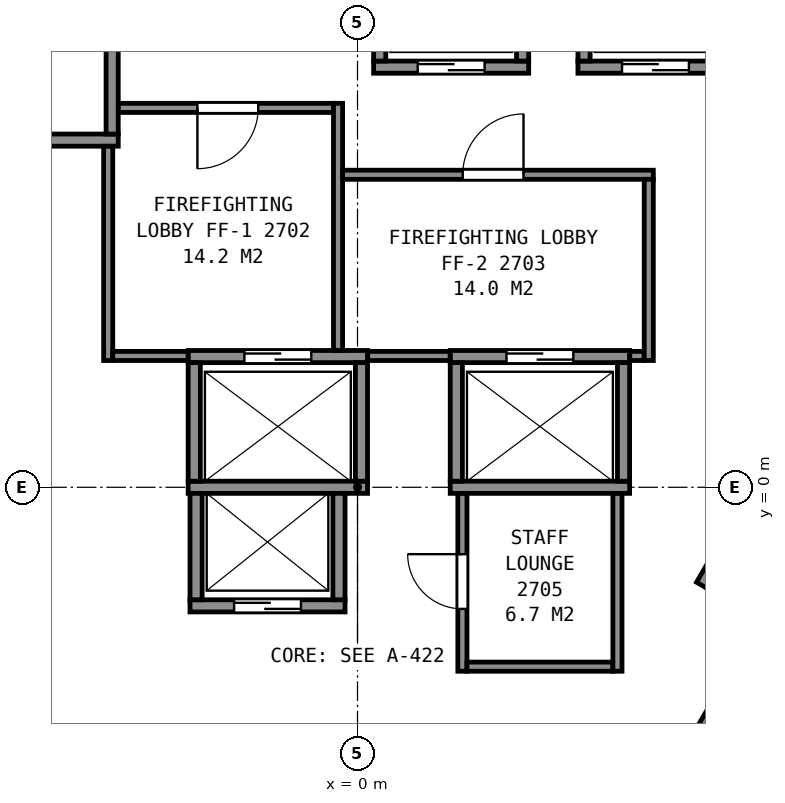
"""IFC4 building model, lengths in metres.
Left out: names, types, materials, properties, quantities, classifications, styles, units other than length and angle.
Written with IfcOpenShell. Run it as: python <this file> out.ifc"""

import sys

from ifc_helpers import new_model, si_unit, direction, frame, frame_2d, origin, place, context, subcontext, project, spatial, rectangle, extrude, element, fill, save


model = new_model("IFC4")
c1 = context("Model", 3, precision=1e-05, world=origin(), true_north=direction((0.0, 1.0)))
c2 = subcontext(c1, "Body", "Model", "MODEL_VIEW")
j1 = project(units=[si_unit("LENGTHUNIT", "METRE"), si_unit("PLANEANGLEUNIT", "RADIAN")], contexts=[c1])
p1 = place(None, origin())
s1 = spatial("IfcSite", under=j1, at=p1, CompositionType="ELEMENT")
p2 = place(p1, origin())
s2 = spatial("IfcBuilding", under=s1, at=p2, CompositionType="ELEMENT")
p3 = place(p2, frame((0.0, 0.0, 114.4)))
s3 = spatial("IfcBuildingStorey", under=s2, at=p3, CompositionType="ELEMENT", Elevation=114.4)
p4 = place(p3, frame((-2.755, -1.95, 0.0), z_axis=(0.0, 0.0, 1.0), x_axis=(1.0, 0.0, 0.0)))
e1 = element("IfcWall", 1, at=p4, inside=s3, PredefinedType="PARTITIONING", context=c2, shape_type="SweptSolid", body=[
    extrude(rectangle(XDim=2.55, YDim=0.2, at=frame_2d((1.275, 0.0))), origin(), (0.0, 0.0, 1.0), 3.6),
])
p5 = place(p4, frame((0.725, 0.0, 0.0)))
e2 = element("IfcOpeningElement", 2, at=p5, cuts=e1, PredefinedType="OPENING", context=c2, shape_type="SweptSolid", body=[
    extrude(rectangle(XDim=1.1, YDim=2.1, at=frame_2d((0.55, 1.05))), frame((0.0, 0.11, 0.0), z_axis=(0.0, -1.0, 0.0), x_axis=(1.0, 0.0, 0.0)), (0.0, 0.0, 1.0), 0.22),
])
p6 = place(p3, frame((-2.785, 0.0, 0.0), z_axis=(0.0, 0.0, 1.0), x_axis=(1.0, 0.0, 0.0)))
e3 = element("IfcWall", 3, at=p6, inside=s3, PredefinedType="PARTITIONING", context=c2, shape_type="SweptSolid", body=[
    extrude(rectangle(XDim=2.95, YDim=0.2, at=frame_2d((1.475, 0.0))), origin(), (0.0, 0.0, 1.0), 3.6),
])
p7 = place(p3, frame((1.525, 0.0, 0.0), z_axis=(0.0, 0.0, 1.0), x_axis=(1.0, 0.0, 0.0)))
e4 = element("IfcWall", 4, at=p7, inside=s3, PredefinedType="PARTITIONING", context=c2, shape_type="SweptSolid", body=[
    extrude(rectangle(XDim=2.95, YDim=0.2, at=frame_2d((1.475, 0.0))), origin(), (0.0, 0.0, 1.0), 3.6),
])
p8 = place(p3, frame((-2.785, 2.15, 0.0), z_axis=(0.0, 0.0, 1.0), x_axis=(1.0, 0.0, 0.0)))
e5 = element("IfcWall", 5, at=p8, inside=s3, PredefinedType="PARTITIONING", context=c2, shape_type="SweptSolid", body=[
    extrude(rectangle(XDim=2.95, YDim=0.2, at=frame_2d((1.475, 0.0))), origin(), (0.0, 0.0, 1.0), 3.6),
])
p9 = place(p8, frame((0.925, 0.0, 0.0)))
e6 = element("IfcOpeningElement", 6, at=p9, cuts=e5, PredefinedType="OPENING", context=c2, shape_type="SweptSolid", body=[
    extrude(rectangle(XDim=1.1, YDim=2.1, at=frame_2d((0.55, 1.05))), frame((0.0, 0.11, 0.0), z_axis=(0.0, -1.0, 0.0), x_axis=(1.0, 0.0, 0.0)), (0.0, 0.0, 1.0), 0.22),
])
p10 = place(p3, frame((1.525, 2.15, 0.0), z_axis=(0.0, 0.0, 1.0), x_axis=(1.0, 0.0, 0.0)))
e7 = element("IfcWall", 7, at=p10, inside=s3, PredefinedType="PARTITIONING", context=c2, shape_type="SweptSolid", body=[
    extrude(rectangle(XDim=2.95, YDim=0.2, at=frame_2d((1.475, 0.0))), origin(), (0.0, 0.0, 1.0), 3.6),
])
p11 = place(p10, frame((0.925, 0.0, 0.0)))
e8 = element("IfcOpeningElement", 8, at=p11, cuts=e7, PredefinedType="OPENING", context=c2, shape_type="SweptSolid", body=[
    extrude(rectangle(XDim=1.1, YDim=2.1, at=frame_2d((0.55, 1.05))), frame((0.0, 0.11, 0.0), z_axis=(0.0, -1.0, 0.0), x_axis=(1.0, 0.0, 0.0)), (0.0, 0.0, 1.0), 0.22),
])
p12 = place(p3, frame((-6.285, 5.71, 0.0), z_axis=(0.0, 0.0, 1.0), x_axis=(1.0, 0.0, 0.0)))
e9 = element("IfcWall", 9, at=p12, inside=s3, PredefinedType="PARTITIONING", context=c2, shape_type="SweptSolid", body=[
    extrude(rectangle(XDim=2.35, YDim=0.2, at=frame_2d((1.175, 0.0))), origin(), (0.0, 0.0, 1.0), 3.6),
])
p13 = place(p3, frame((0.265, 6.91, 0.0), z_axis=(0.0, 0.0, 1.0), x_axis=(1.0, 0.0, 0.0)))
e10 = element("IfcWall", 10, at=p13, inside=s3, PredefinedType="PARTITIONING", context=c2, shape_type="SweptSolid", body=[
    extrude(rectangle(XDim=2.55, YDim=0.2, at=frame_2d((1.275, 0.0))), origin(), (0.0, 0.0, 1.0), 3.6),
])
p14 = place(p13, frame((0.725, 0.0, 0.0)))
e11 = element("IfcOpeningElement", 11, at=p14, cuts=e10, PredefinedType="OPENING", context=c2, shape_type="SweptSolid", body=[
    extrude(rectangle(XDim=1.1, YDim=2.1, at=frame_2d((0.55, 1.05))), frame((0.0, 0.11, 0.0), z_axis=(0.0, -1.0, 0.0), x_axis=(1.0, 0.0, 0.0)), (0.0, 0.0, 1.0), 0.22),
])
p15 = place(p3, frame((3.625, 6.91, 0.0), z_axis=(0.0, 0.0, 1.0), x_axis=(1.0, 0.0, 0.0)))
e12 = element("IfcWall", 12, at=p15, inside=s3, PredefinedType="PARTITIONING", context=c2, shape_type="SweptSolid", body=[
    extrude(rectangle(XDim=2.55, YDim=0.2, at=frame_2d((1.275, 0.0))), origin(), (0.0, 0.0, 1.0), 3.6),
])
p16 = place(p15, frame((0.725, 0.0, 0.0)))
e13 = element("IfcOpeningElement", 13, at=p16, cuts=e12, PredefinedType="OPENING", context=c2, shape_type="SweptSolid", body=[
    extrude(rectangle(XDim=1.1, YDim=2.1, at=frame_2d((0.55, 1.05))), frame((0.0, 0.11, 0.0), z_axis=(0.0, -1.0, 0.0), x_axis=(1.0, 0.0, 0.0)), (0.0, 0.0, 1.0), 0.22),
])
p17 = place(p3, frame((5.527, -4.247, 0.0), z_axis=(0.0, 0.0, 1.0), x_axis=(0.499938297808, 0.866061024631, 0.0)))
e14 = element("IfcWall", 14, at=p17, inside=s3, PredefinedType="PARTITIONING", context=c2, shape_type="SweptSolid", body=[
    extrude(rectangle(XDim=2.35, YDim=0.2, at=frame_2d((1.175, 0.0))), origin(), (0.0, 0.0, 1.0), 3.6),
])
p18 = place(p17, frame((0.725, 0.0, 0.0)))
e15 = element("IfcOpeningElement", 15, at=p18, cuts=e14, PredefinedType="OPENING", context=c2, shape_type="SweptSolid", body=[
    extrude(rectangle(XDim=1.1, YDim=2.1, at=frame_2d((0.55, 1.05))), frame((0.0, 0.11, 0.0), z_axis=(0.0, -1.0, 0.0), x_axis=(1.0, 0.0, 0.0)), (0.0, 0.0, 1.0), 0.22),
])
p19 = place(p3, frame((5.663, -1.612, 0.0), z_axis=(0.0, 0.0, 1.0), x_axis=(0.49998122708, 0.866036242063, 0.0)))
e16 = element("IfcWall", 16, at=p19, inside=s3, PredefinedType="PARTITIONING", context=c2, shape_type="SweptSolid", body=[
    extrude(rectangle(XDim=4.9, YDim=0.2, at=frame_2d((2.45, 0.0))), origin(), (0.0, 0.0, 1.0), 3.6),
])
p20 = place(p3, frame((4.375, 0.1, 0.0), z_axis=(0.0, 0.0, 1.0), x_axis=(0.0, 1.0, 0.0)))
e17 = element("IfcWall", 17, at=p20, inside=s3, PredefinedType="PARTITIONING", context=c2, shape_type="SweptSolid", body=[
    extrude(rectangle(XDim=1.95, YDim=0.2, at=frame_2d((0.975, 0.0))), origin(), (0.0, 0.0, 1.0), 3.6),
])
for number, where, z_axis, x_axis in (
    (18, (3.725, 7.01, 0.0), (0.0, 0.0, 1.0), (0.0, 1.0, 0.0)),
    (19, (2.715, 7.01, 0.0), (0.0, 0.0, 1.0), (0.0, 1.0, 0.0)),
):
    element("IfcWall", number, at=place(p3, frame(where, z_axis=z_axis, x_axis=x_axis)), inside=s3, PredefinedType="PARTITIONING", context=c2, shape_type="SweptSolid", body=[
        extrude(rectangle(XDim=1.75, YDim=0.2, at=frame_2d((0.875, 0.0))), origin(), (0.0, 0.0, 1.0), 3.6),
    ])
p21 = place(p3, frame((1.625, 0.1, 0.0), z_axis=(0.0, 0.0, 1.0), x_axis=(0.0, 1.0, 0.0)))
e20 = element("IfcWall", 20, at=p21, inside=s3, PredefinedType="PARTITIONING", context=c2, shape_type="SweptSolid", body=[
    extrude(rectangle(XDim=1.95, YDim=0.2, at=frame_2d((0.975, 0.0))), origin(), (0.0, 0.0, 1.0), 3.6),
])
p22 = place(p3, frame((0.365, 7.01, 0.0), z_axis=(0.0, 0.0, 1.0), x_axis=(0.0, 1.0, 0.0)))
e21 = element("IfcWall", 21, at=p22, inside=s3, PredefinedType="PARTITIONING", context=c2, shape_type="SweptSolid", body=[
    extrude(rectangle(XDim=1.75, YDim=0.2, at=frame_2d((0.875, 0.0))), origin(), (0.0, 0.0, 1.0), 3.6),
])
p23 = place(p3, frame((0.065, 0.1, 0.0), z_axis=(0.0, 0.0, 1.0), x_axis=(0.0, 1.0, 0.0)))
e22 = element("IfcWall", 22, at=p23, inside=s3, PredefinedType="PARTITIONING", context=c2, shape_type="SweptSolid", body=[
    extrude(rectangle(XDim=1.95, YDim=0.2, at=frame_2d((0.975, 0.0))), origin(), (0.0, 0.0, 1.0), 3.6),
])
for number, where, z_axis, x_axis in (
    (23, (-0.305, -1.85, 0.0), (0.0, 0.0, 1.0), (0.0, 1.0, 0.0)),
    (24, (-2.655, -1.85, 0.0), (0.0, 0.0, 1.0), (0.0, 1.0, 0.0)),
):
    element("IfcWall", number, at=place(p3, frame(where, z_axis=z_axis, x_axis=x_axis)), inside=s3, PredefinedType="PARTITIONING", context=c2, shape_type="SweptSolid", body=[
        extrude(rectangle(XDim=1.75, YDim=0.2, at=frame_2d((0.875, 0.0))), origin(), (0.0, 0.0, 1.0), 3.6),
    ])
p24 = place(p3, frame((-2.685, 0.1, 0.0), z_axis=(0.0, 0.0, 1.0), x_axis=(0.0, 1.0, 0.0)))
e25 = element("IfcWall", 25, at=p24, inside=s3, PredefinedType="PARTITIONING", context=c2, shape_type="SweptSolid", body=[
    extrude(rectangle(XDim=1.95, YDim=0.2, at=frame_2d((0.975, 0.0))), origin(), (0.0, 0.0, 1.0), 3.6),
])
p25 = place(p3, frame((-4.035, 5.81, 0.0), z_axis=(0.0, 0.0, 1.0), x_axis=(0.0, 1.0, 0.0)))
e26 = element("IfcWall", 26, at=p25, inside=s3, PredefinedType="PARTITIONING", context=c2, shape_type="SweptSolid", body=[
    extrude(rectangle(XDim=1.75, YDim=0.2, at=frame_2d((0.875, 0.0))), origin(), (0.0, 0.0, 1.0), 3.6),
])
p26 = place(p3, frame((-13.664, 5.946, 0.0), z_axis=(0.0, 0.0, 1.0), x_axis=(0.499994327219, -0.866028678941, 0.0)))
e27 = element("IfcWall", 27, at=p26, inside=s3, PredefinedType="PARTITIONING", context=c2, shape_type="SweptSolid", body=[
    extrude(rectangle(XDim=23.968, YDim=0.2, at=frame_2d((11.984, 0.0))), origin(), (0.0, 0.0, 1.0), 3.35),
])
p27 = place(p3, frame((-4.152, -5.729, 0.0), z_axis=(0.0, 0.0, 1.0), x_axis=(-0.500024287448, 0.866011380966, 0.0)))
e28 = element("IfcWall", 28, at=p27, inside=s3, PredefinedType="PARTITIONING", context=c2, shape_type="SweptSolid", body=[
    extrude(rectangle(XDim=3.501, YDim=0.15, at=frame_2d((1.75, 0.0))), origin(), (0.0, 0.0, 1.0), 3.35),
])
p28 = place(p27, frame((2.026, 0.0, 0.0)))
e29 = element("IfcOpeningElement", 29, at=p28, cuts=e28, PredefinedType="OPENING", context=c2, shape_type="SweptSolid", body=[
    extrude(rectangle(XDim=0.9, YDim=2.1, at=frame_2d((0.45, 1.05))), frame((0.0, 0.085, 0.0), z_axis=(0.0, -1.0, 0.0), x_axis=(1.0, 0.0, 0.0)), (0.0, 0.0, 1.0), 0.17),
])
p29 = place(p27, frame((0.248, 0.0, 0.0)))
e30 = element("IfcOpeningElement", 30, at=p29, cuts=e28, PredefinedType="OPENING", context=c2, shape_type="SweptSolid", body=[
    extrude(rectangle(XDim=0.9, YDim=2.1, at=frame_2d((0.45, 1.05))), frame((0.0, 0.085, 0.0), z_axis=(0.0, -1.0, 0.0), x_axis=(1.0, 0.0, 0.0)), (0.0, 0.0, 1.0), 0.17),
])
p30 = place(p3, frame((-4.1, 2.085, 0.0), z_axis=(0.0, 0.0, 1.0), x_axis=(0.0, 1.0, 0.0)))
e31 = element("IfcWall", 31, at=p30, inside=s3, PredefinedType="PARTITIONING", context=c2, shape_type="SweptSolid", body=[
    extrude(rectangle(XDim=3.523, YDim=0.15, at=frame_2d((1.761, 0.0))), origin(), (0.0, 0.0, 1.0), 3.35),
])
p31 = place(p3, frame((-4.025, 2.16, 0.0), z_axis=(0.0, 0.0, 1.0), x_axis=(1.0, 0.0, 0.0)))
e32 = element("IfcWall", 32, at=p31, inside=s3, PredefinedType="PARTITIONING", context=c2, shape_type="SweptSolid", body=[
    extrude(rectangle(XDim=1.238, YDim=0.15, at=frame_2d((0.619, 0.0))), origin(), (0.0, 0.0, 1.0), 3.35),
])
p32 = place(p3, frame((-3.933, 6.24, 0.0), z_axis=(0.0, 0.0, 1.0), x_axis=(1.0, 0.0, 0.0)))
e33 = element("IfcWall", 33, at=p32, inside=s3, PredefinedType="PARTITIONING", context=c2, shape_type="SweptSolid", body=[
    extrude(rectangle(XDim=3.538, YDim=0.15, at=frame_2d((1.769, 0.0))), origin(), (0.0, 0.0, 1.0), 3.35),
])
p33 = place(p32, frame((1.3, 0.0, 0.0)))
e34 = element("IfcOpeningElement", 34, at=p33, cuts=e33, PredefinedType="OPENING", context=c2, shape_type="SweptSolid", body=[
    extrude(rectangle(XDim=1.0, YDim=2.1, at=frame_2d((0.5, 1.05))), frame((0.0, 0.085, 0.0), z_axis=(0.0, -1.0, 0.0), x_axis=(1.0, 0.0, 0.0)), (0.0, 0.0, 1.0), 0.17),
])
p34 = place(p3, frame((-0.32, 2.252, 0.0), z_axis=(0.0, 0.0, 1.0), x_axis=(0.0, 1.0, 0.0)))
e35 = element("IfcWall", 35, at=p34, inside=s3, PredefinedType="PARTITIONING", context=c2, shape_type="SweptSolid", body=[
    extrude(rectangle(XDim=4.063, YDim=0.15, at=frame_2d((2.031, 0.0))), origin(), (0.0, 0.0, 1.0), 3.35),
])
p35 = place(p3, frame((-0.245, 5.14, 0.0), z_axis=(0.0, 0.0, 1.0), x_axis=(1.0, 0.0, 0.0)))
e36 = element("IfcWall", 36, at=p35, inside=s3, PredefinedType="PARTITIONING", context=c2, shape_type="SweptSolid", body=[
    extrude(rectangle(XDim=5.11, YDim=0.15, at=frame_2d((2.555, 0.0))), origin(), (0.0, 0.0, 1.0), 3.35),
])
p36 = place(p35, frame((1.975, 0.0, 0.0)))
e37 = element("IfcOpeningElement", 37, at=p36, cuts=e36, PredefinedType="OPENING", context=c2, shape_type="SweptSolid", body=[
    extrude(rectangle(XDim=1.0, YDim=2.1, at=frame_2d((0.5, 1.05))), frame((0.0, 0.085, 0.0), z_axis=(0.0, -1.0, 0.0), x_axis=(1.0, 0.0, 0.0)), (0.0, 0.0, 1.0), 0.17),
])
p37 = place(p3, frame((0.167, 2.16, 0.0), z_axis=(0.0, 0.0, 1.0), x_axis=(1.0, 0.0, 0.0)))
e38 = element("IfcWall", 38, at=p37, inside=s3, PredefinedType="PARTITIONING", context=c2, shape_type="SweptSolid", body=[
    extrude(rectangle(XDim=1.356, YDim=0.15, at=frame_2d((0.678, 0.0))), origin(), (0.0, 0.0, 1.0), 3.35),
])
p38 = place(p3, frame((1.725, -0.102, 0.0), z_axis=(0.0, 0.0, 1.0), x_axis=(0.0, -1.0, 0.0)))
e39 = element("IfcWall", 39, at=p38, inside=s3, PredefinedType="PARTITIONING", context=c2, shape_type="SweptSolid", body=[
    extrude(rectangle(XDim=2.923, YDim=0.15, at=frame_2d((1.461, 0.0))), origin(), (0.0, 0.0, 1.0), 3.35),
])
p39 = place(p38, frame((0.998, 0.0, 0.0)))
e40 = element("IfcOpeningElement", 40, at=p39, cuts=e39, PredefinedType="OPENING", context=c2, shape_type="SweptSolid", body=[
    extrude(rectangle(XDim=0.9, YDim=2.1, at=frame_2d((0.45, 1.05))), frame((0.0, 0.085, 0.0), z_axis=(0.0, -1.0, 0.0), x_axis=(1.0, 0.0, 0.0)), (0.0, 0.0, 1.0), 0.17),
])
p40 = place(p3, frame((1.8, -2.95, 0.0), z_axis=(0.0, 0.0, 1.0), x_axis=(1.0, 0.0, 0.0)))
e41 = element("IfcWall", 41, at=p40, inside=s3, PredefinedType="PARTITIONING", context=c2, shape_type="SweptSolid", body=[
    extrude(rectangle(XDim=2.4, YDim=0.15, at=frame_2d((1.2, 0.0))), origin(), (0.0, 0.0, 1.0), 3.35),
])
p41 = place(p3, frame((4.275, -3.025, 0.0), z_axis=(0.0, 0.0, 1.0), x_axis=(0.0, 1.0, 0.0)))
e42 = element("IfcWall", 42, at=p41, inside=s3, PredefinedType="PARTITIONING", context=c2, shape_type="SweptSolid", body=[
    extrude(rectangle(XDim=2.923, YDim=0.15, at=frame_2d((1.461, 0.0))), origin(), (0.0, 0.0, 1.0), 3.35),
])
p42 = place(p3, frame((4.477, 2.16, 0.0), z_axis=(0.0, 0.0, 1.0), x_axis=(1.0, 0.0, 0.0)))
e43 = element("IfcWall", 43, at=p42, inside=s3, PredefinedType="PARTITIONING", context=c2, shape_type="SweptSolid", body=[
    extrude(rectangle(XDim=0.238, YDim=0.15, at=frame_2d((0.119, 0.0))), origin(), (0.0, 0.0, 1.0), 3.35),
])
p43 = place(p3, frame((4.79, 2.085, 0.0), z_axis=(0.0, 0.0, 1.0), x_axis=(0.0, 1.0, 0.0)))
e44 = element("IfcWall", 44, at=p43, inside=s3, PredefinedType="PARTITIONING", context=c2, shape_type="SweptSolid", body=[
    extrude(rectangle(XDim=2.98, YDim=0.15, at=frame_2d((1.49, 0.0))), origin(), (0.0, 0.0, 1.0), 3.35),
])
p44 = place(p3, frame((-3.756, -15.494, 0.0), z_axis=(0.0, 0.0, 1.0), x_axis=(-0.500027787016, 0.866009360349, 0.0)))
e45 = element("IfcWall", 45, at=p44, inside=s3, PredefinedType="PARTITIONING", context=c2, shape_type="SweptSolid", body=[
    extrude(rectangle(XDim=23.856, YDim=0.125, at=frame_2d((11.928, 0.0))), origin(), (0.0, 0.0, 1.0), 2.613),
])
p45 = place(p44, frame((22.393, 0.0, 0.0)))
e46 = element("IfcOpeningElement", 46, at=p45, cuts=e45, PredefinedType="OPENING", context=c2, shape_type="SweptSolid", body=[
    extrude(rectangle(XDim=1.0, YDim=2.1, at=frame_2d((0.5, 1.05))), frame((0.0, 0.073, 0.0), z_axis=(0.0, -1.0, 0.0), x_axis=(1.0, 0.0, 0.0)), (0.0, 0.0, 1.0), 0.145),
])
p46 = place(p44, frame((12.996, 0.0, 0.0)))
e47 = element("IfcOpeningElement", 47, at=p46, cuts=e45, PredefinedType="OPENING", context=c2, shape_type="SweptSolid", body=[
    extrude(rectangle(XDim=0.9, YDim=2.1, at=frame_2d((0.45, 1.05))), frame((0.0, 0.073, 0.0), z_axis=(0.0, -1.0, 0.0), x_axis=(1.0, 0.0, 0.0)), (0.0, 0.0, 1.0), 0.145),
])
p47 = place(p44, frame((9.011, 0.0, 0.0)))
e48 = element("IfcOpeningElement", 48, at=p47, cuts=e45, PredefinedType="OPENING", context=c2, shape_type="SweptSolid", body=[
    extrude(rectangle(XDim=1.0, YDim=2.1, at=frame_2d((0.5, 1.05))), frame((0.0, 0.073, 0.0), z_axis=(0.0, -1.0, 0.0), x_axis=(1.0, 0.0, 0.0)), (0.0, 0.0, 1.0), 0.145),
])
p48 = place(p3, frame((15.684, 5.165, 0.0), z_axis=(0.0, 0.0, 1.0), x_axis=(-0.500027787016, -0.866009360349, 0.0)))
e49 = element("IfcWall", 49, at=p48, inside=s3, PredefinedType="PARTITIONING", context=c2, shape_type="SweptSolid", body=[
    extrude(rectangle(XDim=23.856, YDim=0.125, at=frame_2d((11.928, 0.0))), origin(), (0.0, 0.0, 1.0), 2.613),
])
p49 = place(p48, frame((20.245, 0.0, 0.0)))
e50 = element("IfcOpeningElement", 50, at=p49, cuts=e49, PredefinedType="OPENING", context=c2, shape_type="SweptSolid", body=[
    extrude(rectangle(XDim=1.0, YDim=2.1, at=frame_2d((0.5, 1.05))), frame((0.0, 0.073, 0.0), z_axis=(0.0, -1.0, 0.0), x_axis=(1.0, 0.0, 0.0)), (0.0, 0.0, 1.0), 0.145),
])
p50 = place(p48, frame((16.943, 0.0, 0.0)))
e51 = element("IfcOpeningElement", 51, at=p50, cuts=e49, PredefinedType="OPENING", context=c2, shape_type="SweptSolid", body=[
    extrude(rectangle(XDim=1.0, YDim=2.1, at=frame_2d((0.5, 1.05))), frame((0.0, 0.073, 0.0), z_axis=(0.0, -1.0, 0.0), x_axis=(1.0, 0.0, 0.0)), (0.0, 0.0, 1.0), 0.145),
])
p51 = place(p48, frame((6.227, 0.0, 0.0)))
e52 = element("IfcOpeningElement", 52, at=p51, cuts=e49, PredefinedType="OPENING", context=c2, shape_type="SweptSolid", body=[
    extrude(rectangle(XDim=1.0, YDim=2.1, at=frame_2d((0.5, 1.05))), frame((0.0, 0.073, 0.0), z_axis=(0.0, -1.0, 0.0), x_axis=(1.0, 0.0, 0.0)), (0.0, 0.0, 1.0), 0.145),
])
p52 = place(p48, frame((2.825, 0.0, 0.0)))
e53 = element("IfcOpeningElement", 53, at=p52, cuts=e49, PredefinedType="OPENING", context=c2, shape_type="SweptSolid", body=[
    extrude(rectangle(XDim=0.9, YDim=2.1, at=frame_2d((0.45, 1.05))), frame((0.0, 0.073, 0.0), z_axis=(0.0, -1.0, 0.0), x_axis=(1.0, 0.0, 0.0)), (0.0, 0.0, 1.0), 0.145),
])
p53 = place(p14, origin())
e54 = element("IfcDoor", 54, at=p53, inside=s3, OperationType="SLIDING_TO_LEFT", PredefinedType="DOOR", context=c2, shape_type="SweptSolid", body=[
    extrude(rectangle(XDim=1.1, YDim=2.1, at=frame_2d((0.55, 1.05))), frame((0.0, 0.025, 0.0), z_axis=(0.0, -1.0, 0.0), x_axis=(1.0, 0.0, 0.0)), (0.0, 0.0, 1.0), 0.05),
])
fill(e11, e54)
p54 = place(p5, origin())
e55 = element("IfcDoor", 55, at=p54, inside=s3, OperationType="SLIDING_TO_RIGHT", PredefinedType="DOOR", context=c2, shape_type="SweptSolid", body=[
    extrude(rectangle(XDim=1.1, YDim=2.1, at=frame_2d((0.55, 1.05))), frame((0.0, 0.025, 0.0), z_axis=(0.0, -1.0, 0.0), x_axis=(1.0, 0.0, 0.0)), (0.0, 0.0, 1.0), 0.05),
])
fill(e2, e55)
p55 = place(p16, origin())
e56 = element("IfcDoor", 56, at=p55, inside=s3, OperationType="SLIDING_TO_LEFT", PredefinedType="DOOR", context=c2, shape_type="SweptSolid", body=[
    extrude(rectangle(XDim=1.1, YDim=2.1, at=frame_2d((0.55, 1.05))), frame((0.0, 0.025, 0.0), z_axis=(0.0, -1.0, 0.0), x_axis=(1.0, 0.0, 0.0)), (0.0, 0.0, 1.0), 0.05),
])
fill(e13, e56)
p56 = place(p9, origin())
e57 = element("IfcDoor", 57, at=p56, inside=s3, OperationType="SLIDING_TO_LEFT", PredefinedType="DOOR", context=c2, shape_type="SweptSolid", body=[
    extrude(rectangle(XDim=1.1, YDim=2.1, at=frame_2d((0.55, 1.05))), frame((0.0, 0.025, 0.0), z_axis=(0.0, -1.0, 0.0), x_axis=(1.0, 0.0, 0.0)), (0.0, 0.0, 1.0), 0.05),
])
fill(e6, e57)
p57 = place(p11, origin())
e58 = element("IfcDoor", 58, at=p57, inside=s3, OperationType="SLIDING_TO_RIGHT", PredefinedType="DOOR", context=c2, shape_type="SweptSolid", body=[
    extrude(rectangle(XDim=1.1, YDim=2.1, at=frame_2d((0.55, 1.05))), frame((0.0, 0.025, 0.0), z_axis=(0.0, -1.0, 0.0), x_axis=(1.0, 0.0, 0.0)), (0.0, 0.0, 1.0), 0.05),
])
fill(e8, e58)
p58 = place(p33, origin())
e59 = element("IfcDoor", 59, at=p58, inside=s3, OperationType="SINGLE_SWING_LEFT", PredefinedType="DOOR", context=c2, shape_type="SweptSolid", body=[
    extrude(rectangle(XDim=1.0, YDim=2.1, at=frame_2d((0.5, 1.05))), frame((0.0, 0.025, 0.0), z_axis=(0.0, -1.0, 0.0), x_axis=(1.0, 0.0, 0.0)), (0.0, 0.0, 1.0), 0.05),
])
fill(e34, e59)
p59 = place(p36, origin())
e60 = element("IfcDoor", 60, at=p59, inside=s3, OperationType="SINGLE_SWING_RIGHT", PredefinedType="DOOR", context=c2, shape_type="SweptSolid", body=[
    extrude(rectangle(XDim=1.0, YDim=2.1, at=frame_2d((0.5, 1.05))), frame((0.0, 0.025, 0.0), z_axis=(0.0, -1.0, 0.0), x_axis=(1.0, 0.0, 0.0)), (0.0, 0.0, 1.0), 0.05),
])
fill(e37, e60)
p60 = place(p39, origin())
e61 = element("IfcDoor", 61, at=p60, inside=s3, OperationType="SINGLE_SWING_LEFT", PredefinedType="DOOR", context=c2, shape_type="SweptSolid", body=[
    extrude(rectangle(XDim=0.9, YDim=2.1, at=frame_2d((0.45, 1.05))), frame((0.0, 0.025, 0.0), z_axis=(0.0, -1.0, 0.0), x_axis=(1.0, 0.0, 0.0)), (0.0, 0.0, 1.0), 0.05),
])
fill(e40, e61)
save(model, sys.argv[1])
